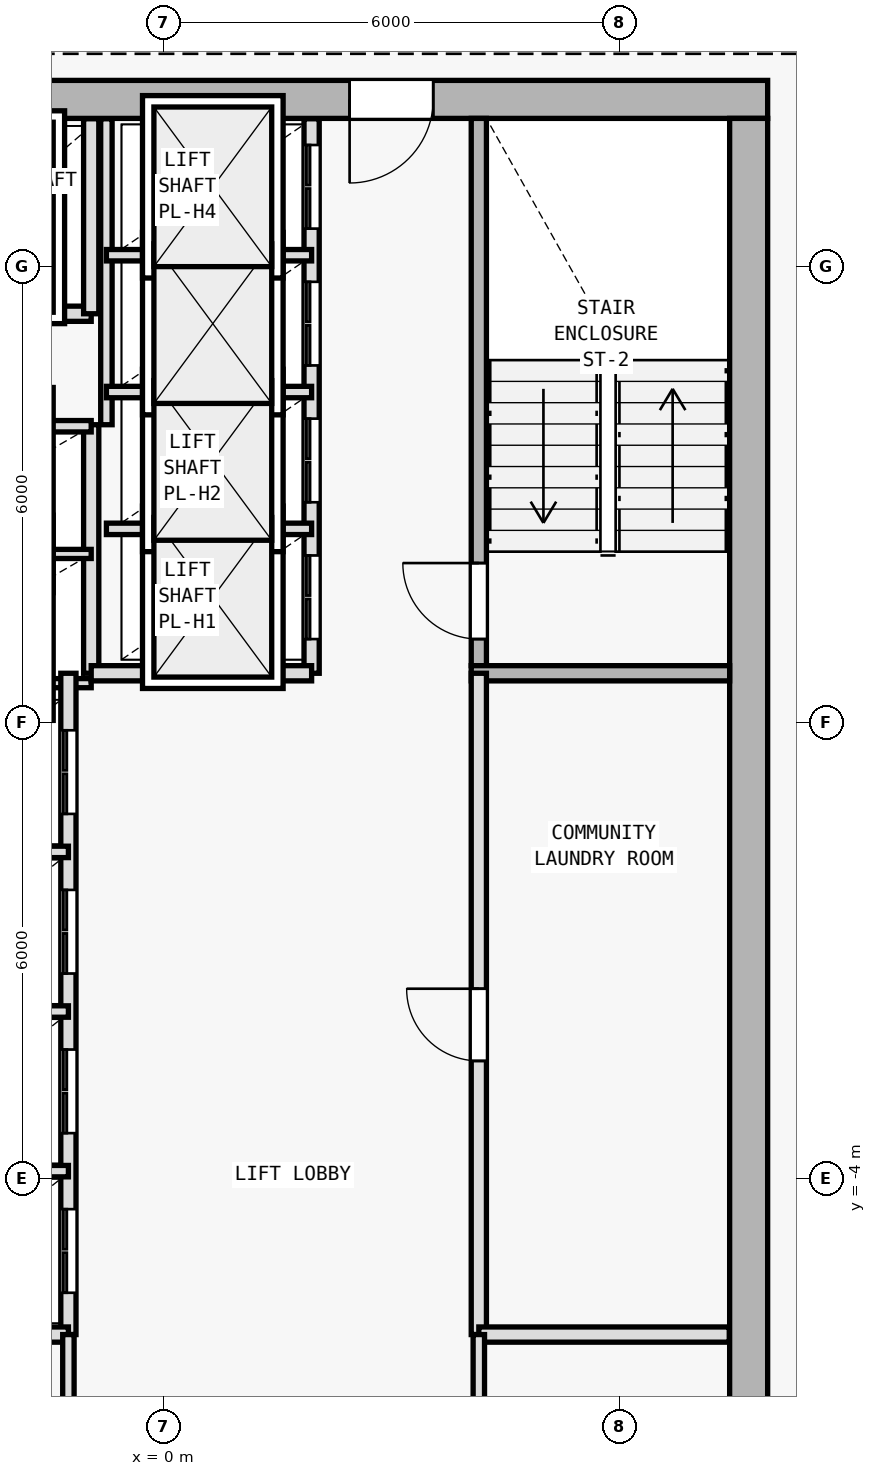
"""IFC4 building model, lengths in metres.
Left out: names, types, materials, properties, quantities, classifications, styles, units other than length and angle.
Written with IfcOpenShell. Run it as: python <this file> out.ifc"""

import sys

from ifc_helpers import new_model, si_unit, direction, frame, frame_2d, origin, origin_2d, place, context, subcontext, project, spatial, rectangle, i_section, extrude, element, fill, save


model = new_model("IFC4")
c1 = context("Model", 3, precision=1e-05, world=origin(), true_north=direction((0.0, 1.0)))
c2 = subcontext(c1, "Body", "Model", "MODEL_VIEW")
j1 = project(units=[si_unit("LENGTHUNIT", "METRE"), si_unit("PLANEANGLEUNIT", "RADIAN")], contexts=[c1])
p1 = place(None, origin())
s1 = spatial("IfcSite", under=j1, at=p1, CompositionType="ELEMENT")
p2 = place(p1, origin())
s2 = spatial("IfcBuilding", under=s1, at=p2, CompositionType="ELEMENT")
p3 = place(p2, frame((0.0, 0.0, 194.7)))
s3 = spatial("IfcBuildingStorey", under=s2, at=p3, CompositionType="ELEMENT", Elevation=194.7)
for number, where, z_axis, x_axis in (
    (1, (7.7, 10.2, 0.0), (0.0, 0.0, 1.0), (1.0, 0.0, 0.0)),
    (2, (7.7, 0.4, 0.0), (0.0, 0.0, 1.0), (1.0, 0.0, 0.0)),
):
    element("IfcColumn", number, at=place(p3, frame(where, z_axis=z_axis, x_axis=x_axis)), inside=s3, PredefinedType="COLUMN", context=c2, shape_type="SweptSolid", body=[
        extrude(i_section(OverallWidth=0.398, OverallDepth=0.387, WebThickness=0.013, FlangeThickness=0.022, FilletRadius=0.015, at=origin_2d()), origin(), (0.0, 0.0, 1.0), 3.6),
    ])
p4 = place(p3, frame((7.95, 10.2, 0.0), z_axis=(0.0, 0.0, 1.0), x_axis=(-1.0, 0.0, 0.0)))
e3 = element("IfcWall", 3, at=p4, inside=s3, PredefinedType="SHEAR", context=c2, shape_type="SweptSolid", body=[
    extrude(rectangle(XDim=15.9, YDim=0.5, at=frame_2d((7.95, 0.0))), origin(), (0.0, 0.0, 1.0), 3.35),
])
p5 = place(p4, frame((4.4, 0.0, 0.0)))
e4 = element("IfcOpeningElement", 4, at=p5, cuts=e3, PredefinedType="OPENING", context=c2, shape_type="SweptSolid", body=[
    extrude(rectangle(XDim=1.1, YDim=2.15, at=frame_2d((0.55, 1.075))), frame((0.0, 0.26, 0.0), z_axis=(0.0, -1.0, 0.0), x_axis=(1.0, 0.0, 0.0)), (0.0, 0.0, 1.0), 0.52),
])
p6 = place(p3, frame((7.7, 9.95, 0.0), z_axis=(0.0, 0.0, 1.0), x_axis=(0.0, -1.0, 0.0)))
e5 = element("IfcWall", 5, at=p6, inside=s3, PredefinedType="SHEAR", context=c2, shape_type="SweptSolid", body=[
    extrude(rectangle(XDim=19.1, YDim=0.5, at=frame_2d((9.55, 0.0))), origin(), (0.0, 0.0, 1.0), 3.35),
])
p7 = place(p3, frame((4.15, 2.75, 0.0), z_axis=(0.0, 0.0, 1.0), x_axis=(0.0, 1.0, 0.0)))
e6 = element("IfcWall", 6, at=p7, inside=s3, PredefinedType="SOLIDWALL", context=c2, shape_type="SweptSolid", body=[
    extrude(rectangle(XDim=7.2, YDim=0.2, at=frame_2d((3.6, 0.0))), origin(), (0.0, 0.0, 1.0), 3.35),
])
p8 = place(p7, frame((0.35, 0.0, 0.0)))
e7 = element("IfcOpeningElement", 7, at=p8, cuts=e6, PredefinedType="OPENING", context=c2, shape_type="SweptSolid", body=[
    extrude(rectangle(XDim=1.0, YDim=2.15, at=frame_2d((0.5, 1.075))), frame((0.0, 0.11, 0.0), z_axis=(0.0, -1.0, 0.0), x_axis=(1.0, 0.0, 0.0)), (0.0, 0.0, 1.0), 0.22),
])
p9 = place(p3, frame((4.05, 2.65, 0.0), z_axis=(0.0, 0.0, 1.0), x_axis=(1.0, 0.0, 0.0)))
e8 = element("IfcWall", 8, at=p9, inside=s3, PredefinedType="SOLIDWALL", context=c2, shape_type="SweptSolid", body=[
    extrude(rectangle(XDim=3.4, YDim=0.2, at=frame_2d((1.7, 0.0))), origin(), (0.0, 0.0, 1.0), 3.35),
])
p10 = place(p3, frame((-0.95, 2.65, 0.0), z_axis=(0.0, 0.0, 1.0), x_axis=(0.0, 1.0, 0.0)))
e9 = element("IfcWall", 9, at=p10, inside=s3, PredefinedType="SOLIDWALL", context=c2, shape_type="SweptSolid", body=[
    extrude(rectangle(XDim=3.27, YDim=0.2, at=frame_2d((1.635, 0.0))), origin(), (0.0, 0.0, 1.0), 3.35),
])
for number, where, z_axis, x_axis in (
    (10, (-3.85, 2.52, 0.0), (0.0, 0.0, 1.0), (1.0, 0.0, 0.0)),
    (11, (-3.85, 4.22, 0.0), (0.0, 0.0, 1.0), (1.0, 0.0, 0.0)),
):
    element("IfcWall", number, at=place(p3, frame(where, z_axis=z_axis, x_axis=x_axis)), inside=s3, PredefinedType="PARTITIONING", context=c2, shape_type="SweptSolid", body=[
        extrude(rectangle(XDim=2.9, YDim=0.12, at=frame_2d((1.45, 0.0))), origin(), (0.0, 0.0, 1.0), 3.35),
    ])
p11 = place(p3, frame((-3.85, 5.9, 0.0), z_axis=(0.0, 0.0, 1.0), x_axis=(1.0, 0.0, 0.0)))
e12 = element("IfcWall", 12, at=p11, inside=s3, PredefinedType="PARTITIONING", context=c2, shape_type="SweptSolid", body=[
    extrude(rectangle(XDim=2.9, YDim=0.15, at=frame_2d((1.45, 0.0))), origin(), (0.0, 0.0, 1.0), 3.35),
])
p12 = place(p3, frame((-3.85, 7.38, 0.0), z_axis=(0.0, 0.0, 1.0), x_axis=(1.0, 0.0, 0.0)))
e13 = element("IfcWall", 13, at=p12, inside=s3, PredefinedType="SOLIDWALL", context=c2, shape_type="SweptSolid", body=[
    extrude(rectangle(XDim=2.9, YDim=0.2, at=frame_2d((1.45, 0.0))), origin(), (0.0, 0.0, 1.0), 3.35),
])
p13 = place(p12, frame((0.85, 0.0, 0.0)))
e14 = element("IfcOpeningElement", 14, at=p13, cuts=e13, PredefinedType="OPENING", context=c2, shape_type="SweptSolid", body=[
    extrude(rectangle(XDim=1.2, YDim=2.2, at=frame_2d((0.6, 1.1))), frame((0.0, 0.11, 0.0), z_axis=(0.0, -1.0, 0.0), x_axis=(1.0, 0.0, 0.0)), (0.0, 0.0, 1.0), 0.22),
])
p14 = place(p3, frame((-0.95, 7.38, 0.0), z_axis=(0.0, 0.0, 1.0), x_axis=(0.0, 1.0, 0.0)))
e15 = element("IfcWall", 15, at=p14, inside=s3, PredefinedType="SOLIDWALL", context=c2, shape_type="SweptSolid", body=[
    extrude(rectangle(XDim=2.565, YDim=0.2, at=frame_2d((1.283, 0.0))), origin(), (0.0, 0.0, 1.0), 3.35),
])
p15 = place(p3, frame((4.15, -6.05, 0.0), z_axis=(0.0, 0.0, 1.0), x_axis=(0.0, 1.0, 0.0)))
e16 = element("IfcWall", 16, at=p15, inside=s3, PredefinedType="SOLIDWALL", context=c2, shape_type="SweptSolid", body=[
    extrude(rectangle(XDim=8.7, YDim=0.2, at=frame_2d((4.35, 0.0))), origin(), (0.0, 0.0, 1.0), 3.35),
])
p16 = place(p15, frame((3.6, 0.0, 0.0)))
e17 = element("IfcOpeningElement", 17, at=p16, cuts=e16, PredefinedType="OPENING", context=c2, shape_type="SweptSolid", body=[
    extrude(rectangle(XDim=0.95, YDim=2.1, at=frame_2d((0.475, 1.05))), frame((0.0, 0.11, 0.0), z_axis=(0.0, -1.0, 0.0), x_axis=(1.0, 0.0, 0.0)), (0.0, 0.0, 1.0), 0.22),
])
p17 = place(p3, frame((-1.25, -6.05, 0.0), z_axis=(0.0, 0.0, 1.0), x_axis=(0.0, 1.0, 0.0)))
e18 = element("IfcWall", 18, at=p17, inside=s3, PredefinedType="SOLIDWALL", context=c2, shape_type="SweptSolid", body=[
    extrude(rectangle(XDim=8.7, YDim=0.2, at=frame_2d((4.35, 0.0))), origin(), (0.0, 0.0, 1.0), 3.35),
])
p18 = place(p17, frame((0.55, 0.0, 0.0)))
e19 = element("IfcOpeningElement", 19, at=p18, cuts=e18, PredefinedType="OPENING", context=c2, shape_type="SweptSolid", body=[
    extrude(rectangle(XDim=1.1, YDim=2.15, at=frame_2d((0.55, 1.075))), frame((0.0, 0.11, 0.0), z_axis=(0.0, -1.0, 0.0), x_axis=(1.0, 0.0, 0.0)), (0.0, 0.0, 1.0), 0.22),
])
p19 = place(p17, frame((2.65, 0.0, 0.0)))
e20 = element("IfcOpeningElement", 20, at=p19, cuts=e18, PredefinedType="OPENING", context=c2, shape_type="SweptSolid", body=[
    extrude(rectangle(XDim=1.1, YDim=2.15, at=frame_2d((0.55, 1.075))), frame((0.0, 0.11, 0.0), z_axis=(0.0, -1.0, 0.0), x_axis=(1.0, 0.0, 0.0)), (0.0, 0.0, 1.0), 0.22),
])
p20 = place(p17, frame((4.75, 0.0, 0.0)))
e21 = element("IfcOpeningElement", 21, at=p20, cuts=e18, PredefinedType="OPENING", context=c2, shape_type="SweptSolid", body=[
    extrude(rectangle(XDim=1.1, YDim=2.15, at=frame_2d((0.55, 1.075))), frame((0.0, 0.11, 0.0), z_axis=(0.0, -1.0, 0.0), x_axis=(1.0, 0.0, 0.0)), (0.0, 0.0, 1.0), 0.22),
])
p21 = place(p17, frame((6.85, 0.0, 0.0)))
e22 = element("IfcOpeningElement", 22, at=p21, cuts=e18, PredefinedType="OPENING", context=c2, shape_type="SweptSolid", body=[
    extrude(rectangle(XDim=1.1, YDim=2.15, at=frame_2d((0.55, 1.075))), frame((0.0, 0.11, 0.0), z_axis=(0.0, -1.0, 0.0), x_axis=(1.0, 0.0, 0.0)), (0.0, 0.0, 1.0), 0.22),
])
for number, where, z_axis, x_axis in (
    (23, (-4.15, -3.9, 0.0), (0.0, 0.0, 1.0), (1.0, 0.0, 0.0)),
    (24, (-4.15, -1.8, 0.0), (0.0, 0.0, 1.0), (1.0, 0.0, 0.0)),
    (25, (-4.15, 0.3, 0.0), (0.0, 0.0, 1.0), (1.0, 0.0, 0.0)),
):
    element("IfcWall", number, at=place(p3, frame(where, z_axis=z_axis, x_axis=x_axis)), inside=s3, PredefinedType="PARTITIONING", context=c2, shape_type="SweptSolid", body=[
        extrude(rectangle(XDim=2.9, YDim=0.15, at=frame_2d((1.45, 0.0))), origin(), (0.0, 0.0, 1.0), 3.35),
    ])
p22 = place(p3, frame((1.95, 2.65, 0.0), z_axis=(0.0, 0.0, 1.0), x_axis=(0.0, 1.0, 0.0)))
e26 = element("IfcWall", 26, at=p22, inside=s3, PredefinedType="SOLIDWALL", context=c2, shape_type="SweptSolid", body=[
    extrude(rectangle(XDim=7.295, YDim=0.2, at=frame_2d((3.647, 0.0))), origin(), (0.0, 0.0, 1.0), 3.35),
])
p23 = place(p22, frame((0.45, 0.0, 0.0)))
e27 = element("IfcOpeningElement", 27, at=p23, cuts=e26, PredefinedType="OPENING", context=c2, shape_type="SweptSolid", body=[
    extrude(rectangle(XDim=1.1, YDim=2.15, at=frame_2d((0.55, 1.075))), frame((0.0, 0.11, 0.0), z_axis=(0.0, -1.0, 0.0), x_axis=(1.0, 0.0, 0.0)), (0.0, 0.0, 1.0), 0.22),
])
p24 = place(p22, frame((2.25, 0.0, 0.0)))
e28 = element("IfcOpeningElement", 28, at=p24, cuts=e26, PredefinedType="OPENING", context=c2, shape_type="SweptSolid", body=[
    extrude(rectangle(XDim=1.1, YDim=2.15, at=frame_2d((0.55, 1.075))), frame((0.0, 0.11, 0.0), z_axis=(0.0, -1.0, 0.0), x_axis=(1.0, 0.0, 0.0)), (0.0, 0.0, 1.0), 0.22),
])
p25 = place(p22, frame((4.05, 0.0, 0.0)))
e29 = element("IfcOpeningElement", 29, at=p25, cuts=e26, PredefinedType="OPENING", context=c2, shape_type="SweptSolid", body=[
    extrude(rectangle(XDim=1.1, YDim=2.15, at=frame_2d((0.55, 1.075))), frame((0.0, 0.11, 0.0), z_axis=(0.0, -1.0, 0.0), x_axis=(1.0, 0.0, 0.0)), (0.0, 0.0, 1.0), 0.22),
])
p26 = place(p22, frame((5.85, 0.0, 0.0)))
e30 = element("IfcOpeningElement", 30, at=p26, cuts=e26, PredefinedType="OPENING", context=c2, shape_type="SweptSolid", body=[
    extrude(rectangle(XDim=1.1, YDim=2.15, at=frame_2d((0.55, 1.075))), frame((0.0, 0.11, 0.0), z_axis=(0.0, -1.0, 0.0), x_axis=(1.0, 0.0, 0.0)), (0.0, 0.0, 1.0), 0.22),
])
p27 = place(p3, frame((-0.95, 2.65, 0.0), z_axis=(0.0, 0.0, 1.0), x_axis=(1.0, 0.0, 0.0)))
e31 = element("IfcWall", 31, at=p27, inside=s3, PredefinedType="SOLIDWALL", context=c2, shape_type="SweptSolid", body=[
    extrude(rectangle(XDim=2.9, YDim=0.2, at=frame_2d((1.45, 0.0))), origin(), (0.0, 0.0, 1.0), 3.35),
])
p28 = place(p3, frame((-0.75, 5.92, 0.0), z_axis=(0.0, 0.0, 1.0), x_axis=(0.0, 1.0, 0.0)))
e32 = element("IfcWall", 32, at=p28, inside=s3, PredefinedType="PARTITIONING", context=c2, shape_type="SweptSolid", body=[
    extrude(rectangle(XDim=4.025, YDim=0.15, at=frame_2d((2.013, 0.0))), origin(), (0.0, 0.0, 1.0), 3.35),
])
for number, where, z_axis, x_axis in (
    (33, (-0.75, 4.55, 0.0), (0.0, 0.0, 1.0), (1.0, 0.0, 0.0)),
    (34, (-0.75, 6.35, 0.0), (0.0, 0.0, 1.0), (1.0, 0.0, 0.0)),
    (35, (-0.75, 8.15, 0.0), (0.0, 0.0, 1.0), (1.0, 0.0, 0.0)),
):
    element("IfcWall", number, at=place(p3, frame(where, z_axis=z_axis, x_axis=x_axis)), inside=s3, PredefinedType="PARTITIONING", context=c2, shape_type="SweptSolid", body=[
        extrude(rectangle(XDim=2.7, YDim=0.15, at=frame_2d((1.35, 0.0))), origin(), (0.0, 0.0, 1.0), 3.35),
    ])
p29 = place(p3, frame((-4.04, -6.05, 0.0), z_axis=(0.0, 0.0, 1.0), x_axis=(1.0, 0.0, 0.0)))
e36 = element("IfcWall", 36, at=p29, inside=s3, PredefinedType="SOLIDWALL", context=c2, shape_type="SweptSolid", body=[
    extrude(rectangle(XDim=2.79, YDim=0.2, at=frame_2d((1.395, 0.0))), origin(), (0.0, 0.0, 1.0), 3.35),
])
p30 = place(p3, frame((4.15, -6.05, 0.0), z_axis=(0.0, 0.0, 1.0), x_axis=(1.0, 0.0, 0.0)))
e37 = element("IfcWall", 37, at=p30, inside=s3, PredefinedType="SOLIDWALL", context=c2, shape_type="SweptSolid", body=[
    extrude(rectangle(XDim=3.295, YDim=0.2, at=frame_2d((1.647, 0.0))), origin(), (0.0, 0.0, 1.0), 3.35),
])
p31 = place(p3, frame((-1.25, -9.145, 0.0), z_axis=(0.0, 0.0, 1.0), x_axis=(0.0, 1.0, 0.0)))
e38 = element("IfcWall", 38, at=p31, inside=s3, PredefinedType="PARTITIONING", context=c2, shape_type="SweptSolid", body=[
    extrude(rectangle(XDim=3.095, YDim=0.15, at=frame_2d((1.547, 0.0))), origin(), (0.0, 0.0, 1.0), 3.35),
])
p32 = place(p31, frame((0.845, 0.0, 0.0)))
e39 = element("IfcOpeningElement", 39, at=p32, cuts=e38, PredefinedType="OPENING", context=c2, shape_type="SweptSolid", body=[
    extrude(rectangle(XDim=0.95, YDim=2.1, at=frame_2d((0.475, 1.05))), frame((0.0, 0.085, 0.0), z_axis=(0.0, -1.0, 0.0), x_axis=(1.0, 0.0, 0.0)), (0.0, 0.0, 1.0), 0.17),
])
p33 = place(p3, frame((4.15, -9.145, 0.0), z_axis=(0.0, 0.0, 1.0), x_axis=(0.0, 1.0, 0.0)))
e40 = element("IfcWall", 40, at=p33, inside=s3, PredefinedType="PARTITIONING", context=c2, shape_type="SweptSolid", body=[
    extrude(rectangle(XDim=3.095, YDim=0.15, at=frame_2d((1.547, 0.0))), origin(), (0.0, 0.0, 1.0), 3.35),
])
p34 = place(p33, frame((0.845, 0.0, 0.0)))
e41 = element("IfcOpeningElement", 41, at=p34, cuts=e40, PredefinedType="OPENING", context=c2, shape_type="SweptSolid", body=[
    extrude(rectangle(XDim=0.9, YDim=2.1, at=frame_2d((0.45, 1.05))), frame((0.0, 0.085, 0.0), z_axis=(0.0, -1.0, 0.0), x_axis=(1.0, 0.0, 0.0)), (0.0, 0.0, 1.0), 0.17),
])
p35 = place(p3, frame((7.023, 12.36, 0.0), z_axis=(0.0, 0.0, 1.0), x_axis=(0.84376480085, -0.536713108511, 0.0)))
e42 = element("IfcWall", 42, at=p35, inside=s3, PredefinedType="PARTITIONING", context=c2, shape_type="SweptSolid", body=[
    extrude(rectangle(XDim=7.297, YDim=0.15, at=frame_2d((3.648, 0.0))), origin(), (0.0, 0.0, 1.0), 2.925),
])
p36 = place(p5, origin())
e43 = element("IfcDoor", 43, at=p36, inside=s3, OperationType="SINGLE_SWING_RIGHT", PredefinedType="DOOR", context=c2, shape_type="SweptSolid", body=[
    extrude(rectangle(XDim=1.1, YDim=2.15, at=frame_2d((0.55, 1.075))), frame((0.0, 0.025, 0.0), z_axis=(0.0, -1.0, 0.0), x_axis=(1.0, 0.0, 0.0)), (0.0, 0.0, 1.0), 0.05),
])
fill(e4, e43)
p37 = place(p8, origin())
e44 = element("IfcDoor", 44, at=p37, inside=s3, OperationType="SINGLE_SWING_RIGHT", PredefinedType="DOOR", context=c2, shape_type="SweptSolid", body=[
    extrude(rectangle(XDim=1.0, YDim=2.15, at=frame_2d((0.5, 1.075))), frame((0.0, 0.025, 0.0), z_axis=(0.0, -1.0, 0.0), x_axis=(1.0, 0.0, 0.0)), (0.0, 0.0, 1.0), 0.05),
])
fill(e7, e44)
p38 = place(p16, origin())
e45 = element("IfcDoor", 45, at=p38, inside=s3, OperationType="SINGLE_SWING_RIGHT", PredefinedType="DOOR", context=c2, shape_type="SweptSolid", body=[
    extrude(rectangle(XDim=0.95, YDim=2.1, at=frame_2d((0.475, 1.05))), frame((0.0, 0.025, 0.0), z_axis=(0.0, -1.0, 0.0), x_axis=(1.0, 0.0, 0.0)), (0.0, 0.0, 1.0), 0.05),
])
fill(e17, e45)
p39 = place(p18, origin())
e46 = element("IfcDoor", 46, at=p39, inside=s3, OperationType="DOUBLE_DOOR_SLIDING", PredefinedType="DOOR", context=c2, shape_type="SweptSolid", body=[
    extrude(rectangle(XDim=1.1, YDim=2.15, at=frame_2d((0.55, 1.075))), frame((0.0, 0.025, 0.0), z_axis=(0.0, -1.0, 0.0), x_axis=(1.0, 0.0, 0.0)), (0.0, 0.0, 1.0), 0.05),
])
fill(e19, e46)
p40 = place(p19, origin())
e47 = element("IfcDoor", 47, at=p40, inside=s3, OperationType="DOUBLE_DOOR_SLIDING", PredefinedType="DOOR", context=c2, shape_type="SweptSolid", body=[
    extrude(rectangle(XDim=1.1, YDim=2.15, at=frame_2d((0.55, 1.075))), frame((0.0, 0.025, 0.0), z_axis=(0.0, -1.0, 0.0), x_axis=(1.0, 0.0, 0.0)), (0.0, 0.0, 1.0), 0.05),
])
fill(e20, e47)
p41 = place(p20, origin())
e48 = element("IfcDoor", 48, at=p41, inside=s3, OperationType="DOUBLE_DOOR_SLIDING", PredefinedType="DOOR", context=c2, shape_type="SweptSolid", body=[
    extrude(rectangle(XDim=1.1, YDim=2.15, at=frame_2d((0.55, 1.075))), frame((0.0, 0.025, 0.0), z_axis=(0.0, -1.0, 0.0), x_axis=(1.0, 0.0, 0.0)), (0.0, 0.0, 1.0), 0.05),
])
fill(e21, e48)
p42 = place(p21, origin())
e49 = element("IfcDoor", 49, at=p42, inside=s3, OperationType="DOUBLE_DOOR_SLIDING", PredefinedType="DOOR", context=c2, shape_type="SweptSolid", body=[
    extrude(rectangle(XDim=1.1, YDim=2.15, at=frame_2d((0.55, 1.075))), frame((0.0, 0.025, 0.0), z_axis=(0.0, -1.0, 0.0), x_axis=(1.0, 0.0, 0.0)), (0.0, 0.0, 1.0), 0.05),
])
fill(e22, e49)
p43 = place(p23, origin())
e50 = element("IfcDoor", 50, at=p43, inside=s3, OperationType="DOUBLE_DOOR_SLIDING", PredefinedType="DOOR", context=c2, shape_type="SweptSolid", body=[
    extrude(rectangle(XDim=1.1, YDim=2.15, at=frame_2d((0.55, 1.075))), frame((0.0, 0.025, 0.0), z_axis=(0.0, -1.0, 0.0), x_axis=(1.0, 0.0, 0.0)), (0.0, 0.0, 1.0), 0.05),
])
fill(e27, e50)
p44 = place(p24, origin())
e51 = element("IfcDoor", 51, at=p44, inside=s3, OperationType="DOUBLE_DOOR_SLIDING", PredefinedType="DOOR", context=c2, shape_type="SweptSolid", body=[
    extrude(rectangle(XDim=1.1, YDim=2.15, at=frame_2d((0.55, 1.075))), frame((0.0, 0.025, 0.0), z_axis=(0.0, -1.0, 0.0), x_axis=(1.0, 0.0, 0.0)), (0.0, 0.0, 1.0), 0.05),
])
fill(e28, e51)
p45 = place(p25, origin())
e52 = element("IfcDoor", 52, at=p45, inside=s3, OperationType="DOUBLE_DOOR_SLIDING", PredefinedType="DOOR", context=c2, shape_type="SweptSolid", body=[
    extrude(rectangle(XDim=1.1, YDim=2.15, at=frame_2d((0.55, 1.075))), frame((0.0, 0.025, 0.0), z_axis=(0.0, -1.0, 0.0), x_axis=(1.0, 0.0, 0.0)), (0.0, 0.0, 1.0), 0.05),
])
fill(e29, e52)
p46 = place(p26, origin())
e53 = element("IfcDoor", 53, at=p46, inside=s3, OperationType="DOUBLE_DOOR_SLIDING", PredefinedType="DOOR", context=c2, shape_type="SweptSolid", body=[
    extrude(rectangle(XDim=1.1, YDim=2.15, at=frame_2d((0.55, 1.075))), frame((0.0, 0.025, 0.0), z_axis=(0.0, -1.0, 0.0), x_axis=(1.0, 0.0, 0.0)), (0.0, 0.0, 1.0), 0.05),
])
fill(e30, e53)
save(model, sys.argv[1])
